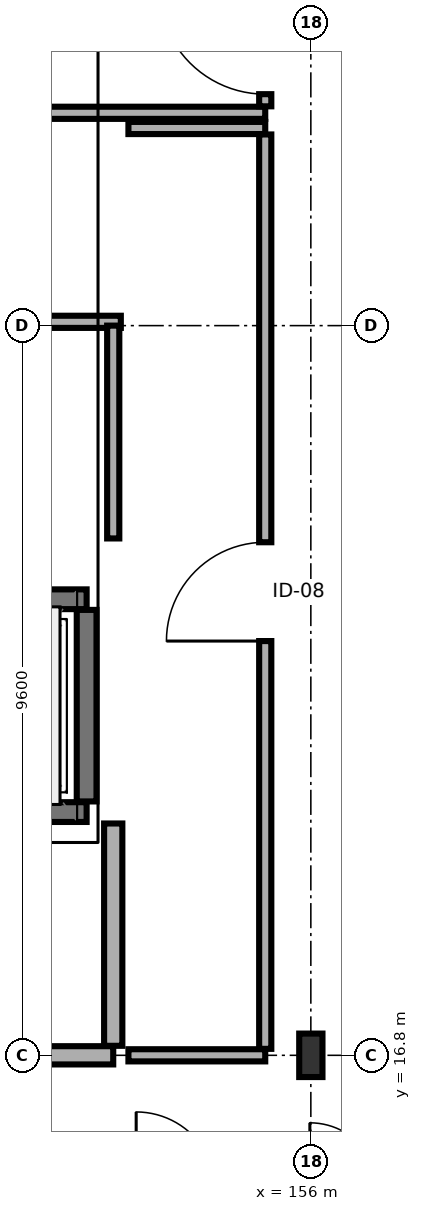
"""IFC4 building model, lengths in metres.
Left out: names, types, materials, properties, quantities, classifications, styles, units other than length and angle.
Written with IfcOpenShell. Run it as: python <this file> out.ifc"""

import sys

from ifc_helpers import new_model, si_unit, direction, frame, frame_2d, origin, origin_2d, place, context, subcontext, project, spatial, rectangle, i_section, extrude, element, fill, save


model = new_model("IFC4")
c1 = context("Model", 3, precision=1e-05, world=origin(), true_north=direction((0.0, 1.0)))
c2 = subcontext(c1, "Body", "Model", "MODEL_VIEW")
j1 = project(units=[si_unit("LENGTHUNIT", "METRE"), si_unit("PLANEANGLEUNIT", "RADIAN")], contexts=[c1])
p1 = place(None, origin())
s1 = spatial("IfcSite", under=j1, at=p1, CompositionType="ELEMENT")
p2 = place(p1, origin())
s2 = spatial("IfcBuilding", under=s1, at=p2, CompositionType="ELEMENT")
p3 = place(p2, frame((0.0, 0.0, 28.3)))
s3 = spatial("IfcBuildingStorey", under=s2, at=p3, CompositionType="ELEMENT", Elevation=28.3)
p4 = place(p3, frame((156.0, 16.8, 0.0), z_axis=(0.0, 0.0, 1.0), x_axis=(1.0, 0.0, 0.0)))
e1 = element("IfcColumn", 1, at=p4, inside=s3, PredefinedType="COLUMN", context=c2, shape_type="SweptSolid", body=[
    extrude(i_section(OverallWidth=0.306, OverallDepth=0.572, WebThickness=0.021, FlangeThickness=0.04, FilletRadius=0.027, at=origin_2d()), origin(), (0.0, 0.0, 1.0), 3.4),
])
p5 = place(p3, frame((150.55, 20.0, 0.0), z_axis=(0.0, 0.0, 1.0), x_axis=(1.0, 0.0, 0.0)))
e2 = element("IfcWall", 2, at=p5, inside=s3, PredefinedType="SHEAR", context=c2, shape_type="SweptSolid", body=[
    extrude(rectangle(XDim=2.5, YDim=0.26, at=frame_2d((1.25, 0.0))), origin(), (0.0, 0.0, 1.0), 3.175),
])
p6 = place(p5, frame((0.55, 0.0, 0.0)))
e3 = element("IfcOpeningElement", 3, at=p6, cuts=e2, PredefinedType="OPENING", context=c2, shape_type="SweptSolid", body=[
    extrude(rectangle(XDim=1.4, YDim=2.3, at=frame_2d((0.7, 1.15))), frame((0.0, 0.14, 0.0), z_axis=(0.0, -1.0, 0.0), x_axis=(1.0, 0.0, 0.0)), (0.0, 0.0, 1.0), 0.28),
])
p7 = place(p3, frame((150.55, 22.8, 0.0), z_axis=(0.0, 0.0, 1.0), x_axis=(1.0, 0.0, 0.0)))
e4 = element("IfcWall", 4, at=p7, inside=s3, PredefinedType="SHEAR", context=c2, shape_type="SweptSolid", body=[
    extrude(rectangle(XDim=2.5, YDim=0.26, at=frame_2d((1.25, 0.0))), origin(), (0.0, 0.0, 1.0), 3.175),
])
p8 = place(p3, frame((153.05, 20.14, 0.0), z_axis=(0.0, 0.0, 1.0), x_axis=(0.0, 1.0, 0.0)))
e5 = element("IfcWall", 5, at=p8, inside=s3, PredefinedType="SHEAR", context=c2, shape_type="SweptSolid", body=[
    extrude(rectangle(XDim=2.52, YDim=0.26, at=frame_2d((1.26, 0.0))), origin(), (0.0, 0.0, 1.0), 3.175),
])
p9 = place(p3, frame((146.4, 16.8, 0.0), z_axis=(0.0, 0.0, 1.0), x_axis=(1.0, 0.0, 0.0)))
e6 = element("IfcWall", 6, at=p9, inside=s3, PredefinedType="SOLIDWALL", context=c2, shape_type="SweptSolid", body=[
    extrude(rectangle(XDim=7.0, YDim=0.24, at=frame_2d((3.5, 0.0))), origin(), (0.0, 0.0, 1.0), 2.71),
])
p10 = place(p9, frame((2.7, 0.0, 0.0)))
e7 = element("IfcOpeningElement", 7, at=p10, cuts=e6, PredefinedType="OPENING", context=c2, shape_type="SweptSolid", body=[
    extrude(rectangle(XDim=1.6, YDim=2.2, at=frame_2d((0.8, 1.1))), frame((0.0, 0.13, 0.0), z_axis=(0.0, -1.0, 0.0), x_axis=(1.0, 0.0, 0.0)), (0.0, 0.0, 1.0), 0.26),
])
p11 = place(p3, frame((153.4, 16.925, 0.0), z_axis=(0.0, 0.0, 1.0), x_axis=(0.0, 1.0, 0.0)))
e8 = element("IfcWall", 8, at=p11, inside=s3, PredefinedType="SOLIDWALL", context=c2, shape_type="SweptSolid", body=[
    extrude(rectangle(XDim=2.925, YDim=0.24, at=frame_2d((1.462, 0.0))), origin(), (0.0, 0.0, 1.0), 2.71),
])
p12 = place(p3, frame((146.4, 29.2, 0.0), z_axis=(0.0, 0.0, 1.0), x_axis=(1.0, 0.0, 0.0)))
e9 = element("IfcWall", 9, at=p12, inside=s3, PredefinedType="PARTITIONING", context=c2, shape_type="SweptSolid", body=[
    extrude(rectangle(XDim=9.0, YDim=0.16, at=frame_2d((4.5, 0.0))), origin(), (0.0, 0.0, 1.0), 3.175),
])
p13 = place(p3, frame((155.4, 29.285, 0.0), z_axis=(0.0, 0.0, 1.0), x_axis=(0.0, 1.0, 0.0)))
e10 = element("IfcWall", 10, at=p13, inside=s3, PredefinedType="PARTITIONING", context=c2, shape_type="SweptSolid", body=[
    extrude(rectangle(XDim=9.03, YDim=0.16, at=frame_2d((4.515, 0.0))), origin(), (0.0, 0.0, 1.0), 3.175),
])
p14 = place(p13, frame((0.16, 0.0, 0.0)))
e11 = element("IfcOpeningElement", 11, at=p14, cuts=e10, PredefinedType="OPENING", context=c2, shape_type="SweptSolid", body=[
    extrude(rectangle(XDim=1.4, YDim=2.2, at=frame_2d((0.7, 1.1))), frame((0.0, 0.09, 0.0), z_axis=(0.0, -1.0, 0.0), x_axis=(1.0, 0.0, 0.0)), (0.0, 0.0, 1.0), 0.18),
])
p15 = place(p3, frame((153.6, 16.8, 0.0), z_axis=(0.0, 0.0, 1.0), x_axis=(1.0, 0.0, 0.0)))
e12 = element("IfcWall", 12, at=p15, inside=s3, PredefinedType="PARTITIONING", context=c2, shape_type="SweptSolid", body=[
    extrude(rectangle(XDim=1.8, YDim=0.16, at=frame_2d((0.9, 0.0))), origin(), (0.0, 0.0, 1.0), 2.71),
])
p16 = place(p3, frame((153.6, 29.0, 0.0), z_axis=(0.0, 0.0, 1.0), x_axis=(1.0, 0.0, 0.0)))
e13 = element("IfcWall", 13, at=p16, inside=s3, PredefinedType="PARTITIONING", context=c2, shape_type="SweptSolid", body=[
    extrude(rectangle(XDim=1.8, YDim=0.16, at=frame_2d((0.9, 0.0))), origin(), (0.0, 0.0, 1.0), 3.175),
])
p17 = place(p3, frame((155.4, 16.885, 0.0), z_axis=(0.0, 0.0, 1.0), x_axis=(0.0, 1.0, 0.0)))
e14 = element("IfcWall", 14, at=p17, inside=s3, PredefinedType="PARTITIONING", context=c2, shape_type="SweptSolid", body=[
    extrude(rectangle(XDim=12.03, YDim=0.16, at=frame_2d((6.015, 0.0))), origin(), (0.0, 0.0, 1.0), 2.71),
])
p18 = place(p17, frame((5.365, 0.0, 0.0)))
e15 = element("IfcOpeningElement", 15, at=p18, cuts=e14, PredefinedType="OPENING", context=c2, shape_type="SweptSolid", body=[
    extrude(rectangle(XDim=1.3, YDim=2.2, at=frame_2d((0.65, 1.1))), frame((0.0, 0.09, 0.0), z_axis=(0.0, -1.0, 0.0), x_axis=(1.0, 0.0, 0.0)), (0.0, 0.0, 1.0), 0.18),
])
p19 = place(p3, frame((152.35, 26.45, 0.0), z_axis=(0.0, 0.0, 1.0), x_axis=(1.0, 0.0, 0.0)))
e16 = element("IfcWall", 16, at=p19, inside=s3, PredefinedType="PARTITIONING", context=c2, shape_type="SweptSolid", body=[
    extrude(rectangle(XDim=1.15, YDim=0.16, at=frame_2d((0.575, 0.0))), origin(), (0.0, 0.0, 1.0), 3.175),
])
p20 = place(p3, frame((153.4, 23.6, 0.0), z_axis=(0.0, 0.0, 1.0), x_axis=(0.0, 1.0, 0.0)))
e17 = element("IfcWall", 17, at=p20, inside=s3, PredefinedType="PARTITIONING", context=c2, shape_type="SweptSolid", body=[
    extrude(rectangle(XDim=2.8, YDim=0.16, at=frame_2d((1.4, 0.0))), origin(), (0.0, 0.0, 1.0), 3.175),
])
p21 = place(p14, origin())
e18 = element("IfcDoor", 18, at=p21, inside=s3, OperationType="SINGLE_SWING_RIGHT", PredefinedType="DOOR", context=c2, shape_type="SweptSolid", body=[
    extrude(rectangle(XDim=1.4, YDim=2.2, at=frame_2d((0.7, 1.1))), frame((0.0, 0.025, 0.0), z_axis=(0.0, -1.0, 0.0), x_axis=(1.0, 0.0, 0.0)), (0.0, 0.0, 1.0), 0.05),
])
fill(e11, e18)
p22 = place(p18, origin())
e19 = element("IfcDoor", 19, at=p22, inside=s3, OperationType="SINGLE_SWING_LEFT", PredefinedType="DOOR", context=c2, shape_type="SweptSolid", body=[
    extrude(rectangle(XDim=1.3, YDim=2.2, at=frame_2d((0.65, 1.1))), frame((0.0, 0.025, 0.0), z_axis=(0.0, -1.0, 0.0), x_axis=(1.0, 0.0, 0.0)), (0.0, 0.0, 1.0), 0.05),
])
fill(e15, e19)
save(model, sys.argv[1])
